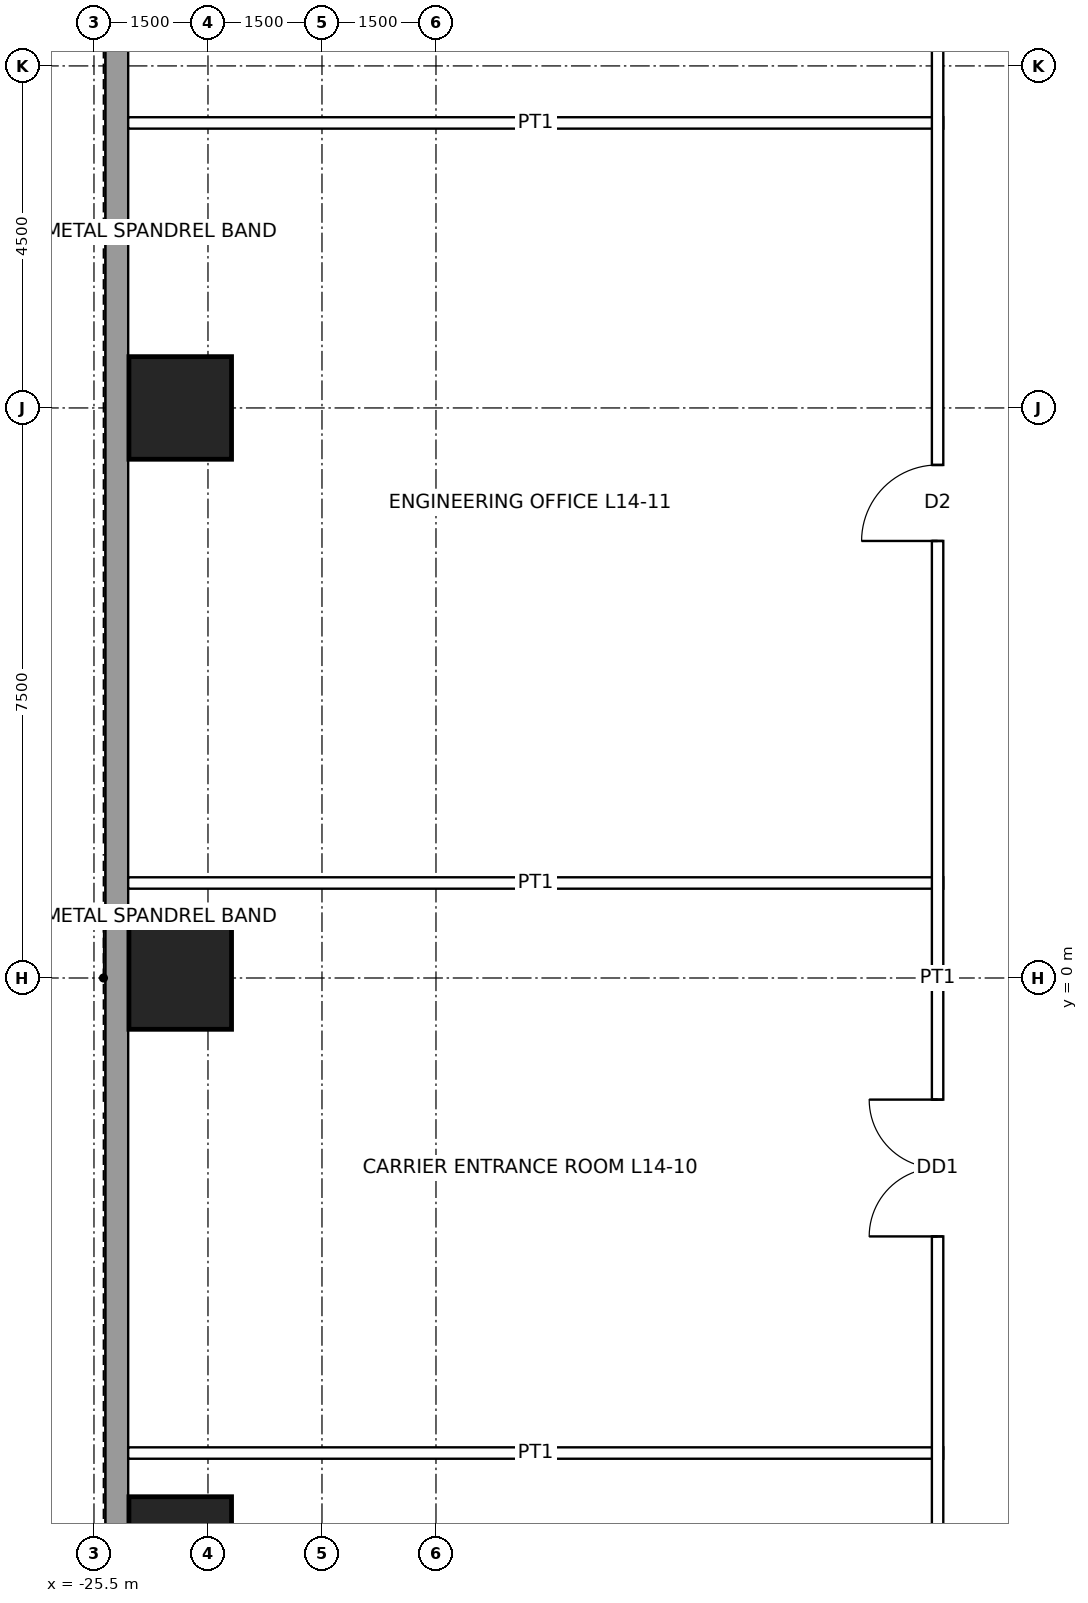
"""IFC4 building model, lengths in metres.
Left out: names, types, materials, properties, quantities, classifications, styles, units other than length and angle.
Written with IfcOpenShell. Run it as: python <this file> out.ifc"""

import sys

from ifc_helpers import new_model, si_unit, direction, frame, frame_2d, origin, origin_2d, place, context, subcontext, project, spatial, rectangle, hollow_rectangle, extrude, element, fill, save


model = new_model("IFC4")
c1 = context("Model", 3, precision=1e-05, world=origin(), true_north=direction((0.0, 1.0)))
c2 = subcontext(c1, "Body", "Model", "MODEL_VIEW")
j1 = project(units=[si_unit("LENGTHUNIT", "METRE"), si_unit("PLANEANGLEUNIT", "RADIAN")], contexts=[c1])
p1 = place(None, origin())
s1 = spatial("IfcSite", under=j1, at=p1, CompositionType="ELEMENT")
p2 = place(p1, origin())
s2 = spatial("IfcBuilding", under=s1, at=p2, CompositionType="ELEMENT")
p3 = place(p2, frame((0.0, 0.0, 73.4)))
s3 = spatial("IfcBuildingStorey", under=s2, at=p3, CompositionType="ELEMENT", Elevation=73.4)
for number, where, z_axis, x_axis in (
    (1, (-24.365, -7.5, 0.0), (0.0, 0.0, 1.0), (1.0, 0.0, 0.0)),
    (2, (-24.365, 0.0, 0.0), (0.0, 0.0, 1.0), (1.0, 0.0, 0.0)),
    (3, (-24.365, 7.5, 0.0), (0.0, 0.0, 1.0), (1.0, 0.0, 0.0)),
):
    element("IfcColumn", number, at=place(p3, frame(where, z_axis=z_axis, x_axis=x_axis)), inside=s3, PredefinedType="COLUMN", context=c2, shape_type="SweptSolid", body=[
        extrude(hollow_rectangle(XDim=1.35, YDim=1.35, WallThickness=0.085, at=origin_2d()), origin(), (0.0, 0.0, 1.0), 5.0),
    ])
p4 = place(p3, frame((-25.2, -17.7, 0.0), z_axis=(0.0, 0.0, 1.0), x_axis=(0.0, 1.0, 0.0)))
e4 = element("IfcWall", 4, at=p4, inside=s3, PredefinedType="SOLIDWALL", context=c2, shape_type="SweptSolid", body=[
    extrude(rectangle(XDim=35.4, YDim=0.3, at=frame_2d((17.7, 0.0))), origin(), (0.0, 0.0, 1.0), 4.8),
])
for number, where, z_axis, x_axis in (
    (5, (-25.05, -6.25, 0.0), (0.0, 0.0, 1.0), (1.0, 0.0, 0.0)),
    (6, (-25.05, 1.25, 0.0), (0.0, 0.0, 1.0), (1.0, 0.0, 0.0)),
):
    element("IfcWall", number, at=place(p3, frame(where, z_axis=z_axis, x_axis=x_axis)), inside=s3, PredefinedType="PARTITIONING", context=c2, shape_type="SweptSolid", body=[
        extrude(rectangle(XDim=10.725, YDim=0.15, at=frame_2d((5.363, 0.0))), origin(), (0.0, 0.0, 1.0), 4.8),
    ])
p5 = place(p3, frame((-25.05, 11.25, 0.0), z_axis=(0.0, 0.0, 1.0), x_axis=(1.0, 0.0, 0.0)))
e7 = element("IfcWall", 7, at=p5, inside=s3, PredefinedType="PARTITIONING", context=c2, shape_type="SweptSolid", body=[
    extrude(rectangle(XDim=10.725, YDim=0.15, at=frame_2d((5.363, 0.0))), origin(), (0.0, 0.0, 1.0), 3.853),
])
p6 = place(p3, frame((-14.4, -14.475, 0.0), z_axis=(0.0, 0.0, 1.0), x_axis=(0.0, 1.0, 0.0)))
e8 = element("IfcWall", 8, at=p6, inside=s3, PredefinedType="PARTITIONING", context=c2, shape_type="SweptSolid", body=[
    extrude(rectangle(XDim=28.95, YDim=0.15, at=frame_2d((14.475, 0.0))), origin(), (0.0, 0.0, 1.0), 4.8),
])
p7 = place(p6, frame((4.825, 0.0, 0.0)))
e9 = element("IfcOpeningElement", 9, at=p7, cuts=e8, PredefinedType="OPENING", context=c2, shape_type="SweptSolid", body=[
    extrude(rectangle(XDim=1.8, YDim=2.4, at=frame_2d((0.9, 1.2))), frame((0.0, 0.085, 0.0), z_axis=(0.0, -1.0, 0.0), x_axis=(1.0, 0.0, 0.0)), (0.0, 0.0, 1.0), 0.17),
])
p8 = place(p6, frame((11.075, 0.0, 0.0)))
e10 = element("IfcOpeningElement", 10, at=p8, cuts=e8, PredefinedType="OPENING", context=c2, shape_type="SweptSolid", body=[
    extrude(rectangle(XDim=1.8, YDim=2.4, at=frame_2d((0.9, 1.2))), frame((0.0, 0.085, 0.0), z_axis=(0.0, -1.0, 0.0), x_axis=(1.0, 0.0, 0.0)), (0.0, 0.0, 1.0), 0.17),
])
p9 = place(p6, frame((20.225, 0.0, 0.0)))
e11 = element("IfcOpeningElement", 11, at=p9, cuts=e8, PredefinedType="OPENING", context=c2, shape_type="SweptSolid", body=[
    extrude(rectangle(XDim=1.0, YDim=2.1, at=frame_2d((0.5, 1.05))), frame((0.0, 0.085, 0.0), z_axis=(0.0, -1.0, 0.0), x_axis=(1.0, 0.0, 0.0)), (0.0, 0.0, 1.0), 0.17),
])
p10 = place(p8, origin())
e12 = element("IfcDoor", 12, at=p10, inside=s3, OperationType="DOUBLE_DOOR_SINGLE_SWING", PredefinedType="DOOR", context=c2, shape_type="SweptSolid", body=[
    extrude(rectangle(XDim=1.8, YDim=2.4, at=frame_2d((0.9, 1.2))), frame((0.0, 0.025, 0.0), z_axis=(0.0, -1.0, 0.0), x_axis=(1.0, 0.0, 0.0)), (0.0, 0.0, 1.0), 0.05),
])
fill(e10, e12)
p11 = place(p9, origin())
e13 = element("IfcDoor", 13, at=p11, inside=s3, OperationType="SINGLE_SWING_LEFT", PredefinedType="DOOR", context=c2, shape_type="SweptSolid", body=[
    extrude(rectangle(XDim=1.0, YDim=2.1, at=frame_2d((0.5, 1.05))), frame((0.0, 0.025, 0.0), z_axis=(0.0, -1.0, 0.0), x_axis=(1.0, 0.0, 0.0)), (0.0, 0.0, 1.0), 0.05),
])
fill(e11, e13)
save(model, sys.argv[1])
